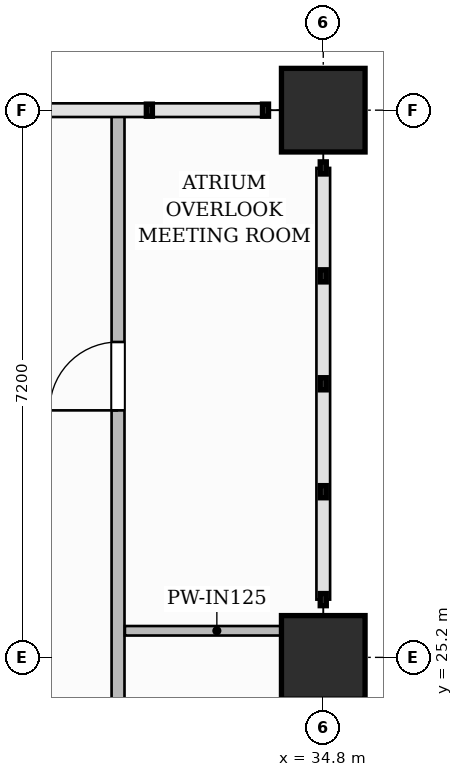
"""IFC4 building model, lengths in metres.
Left out: names, types, materials, properties, quantities, classifications, styles, units other than length and angle.
Written with IfcOpenShell. Run it as: python <this file> out.ifc"""

import sys

from ifc_helpers import new_model, si_unit, direction, frame, frame_2d, origin, origin_2d, place, context, subcontext, project, spatial, rectangle, extrude, source, transform, mapped, element, fill, save


model = new_model("IFC4")
c1 = context("Model", 3, precision=1e-05, world=origin(), true_north=direction((0.0, 1.0)))
c2 = subcontext(c1, "Body", "Model", "MODEL_VIEW")
j1 = project(units=[si_unit("LENGTHUNIT", "METRE"), si_unit("PLANEANGLEUNIT", "RADIAN")], contexts=[c1])
p1 = place(None, origin())
s1 = spatial("IfcSite", under=j1, at=p1, CompositionType="ELEMENT")
p2 = place(p1, origin())
s2 = spatial("IfcBuilding", under=s1, at=p2, CompositionType="ELEMENT")
p3 = place(p2, frame((0.0, 0.0, 80.5)))
s3 = spatial("IfcBuildingStorey", under=s2, at=p3, CompositionType="ELEMENT", Elevation=80.5)
m1 = source(origin(), c2, "Body", "SweptSolid", [
    extrude(rectangle(XDim=1.1, YDim=1.1, at=origin_2d()), origin(), (0.0, 0.0, 1.0), 3.7),
])
for number, where, z_axis, x_axis in (
    (1, (34.8, 25.2, 0.0), (0.0, 0.0, 1.0), (1.0, 0.0, 0.0)),
    (2, (34.8, 32.4, 0.0), (0.0, 0.0, 1.0), (1.0, 0.0, 0.0)),
):
    element("IfcColumn", number, at=place(p3, frame(where, z_axis=z_axis, x_axis=x_axis)), inside=s3, PredefinedType="COLUMN", context=c2, shape_type="MappedRepresentation", body=[
        mapped(m1, transform((0.0, 0.0, 0.0), scale=1.0)),
    ])
p4 = place(p3, frame((32.1, 21.67, 0.0), z_axis=(0.0, 0.0, 1.0), x_axis=(0.0, 1.0, 0.0)))
e3 = element("IfcWall", 3, at=p4, inside=s3, PredefinedType="PARTITIONING", context=c2, shape_type="SweptSolid", body=[
    extrude(rectangle(XDim=10.702, YDim=0.17, at=frame_2d((5.351, 0.0))), origin(), (0.0, 0.0, 1.0), 3.45),
])
p5 = place(p4, frame((1.53, 0.0, 0.0)))
e4 = element("IfcOpeningElement", 4, at=p5, cuts=e3, PredefinedType="OPENING", context=c2, shape_type="SweptSolid", body=[
    extrude(rectangle(XDim=0.9, YDim=2.15, at=frame_2d((0.45, 1.075))), frame((0.0, 0.095, 0.0), z_axis=(0.0, -1.0, 0.0), x_axis=(1.0, 0.0, 0.0)), (0.0, 0.0, 1.0), 0.19),
])
p6 = place(p4, frame((6.78, 0.0, 0.0)))
e5 = element("IfcOpeningElement", 5, at=p6, cuts=e3, PredefinedType="OPENING", context=c2, shape_type="SweptSolid", body=[
    extrude(rectangle(XDim=0.9, YDim=2.15, at=frame_2d((0.45, 1.075))), frame((0.0, 0.095, 0.0), z_axis=(0.0, -1.0, 0.0), x_axis=(1.0, 0.0, 0.0)), (0.0, 0.0, 1.0), 0.19),
])
p7 = place(p3, frame((32.19, 25.55, 0.0), z_axis=(0.0, 0.0, 1.0), x_axis=(1.0, 0.0, 0.0)))
e6 = element("IfcWall", 6, at=p7, inside=s3, PredefinedType="PARTITIONING", context=c2, shape_type="SweptSolid", body=[
    extrude(rectangle(XDim=2.42, YDim=0.125, at=frame_2d((1.21, 0.0))), origin(), (0.0, 0.0, 1.0), 3.45),
])
m2 = source(origin(), c2, "Body", "SweptSolid", [
    extrude(rectangle(XDim=0.9, YDim=2.15, at=frame_2d((0.45, 1.075))), frame((0.0, 0.025, 0.0), z_axis=(0.0, -1.0, 0.0), x_axis=(1.0, 0.0, 0.0)), (0.0, 0.0, 1.0), 0.05),
])
p8 = place(p6, origin())
e7 = element("IfcDoor", 7, at=p8, inside=s3, OperationType="SINGLE_SWING_LEFT", PredefinedType="DOOR", context=c2, shape_type="MappedRepresentation", body=[
    mapped(m2, transform((0.0, 0.0, 0.0), scale=1.0)),
])
fill(e5, e7)
save(model, sys.argv[1])
